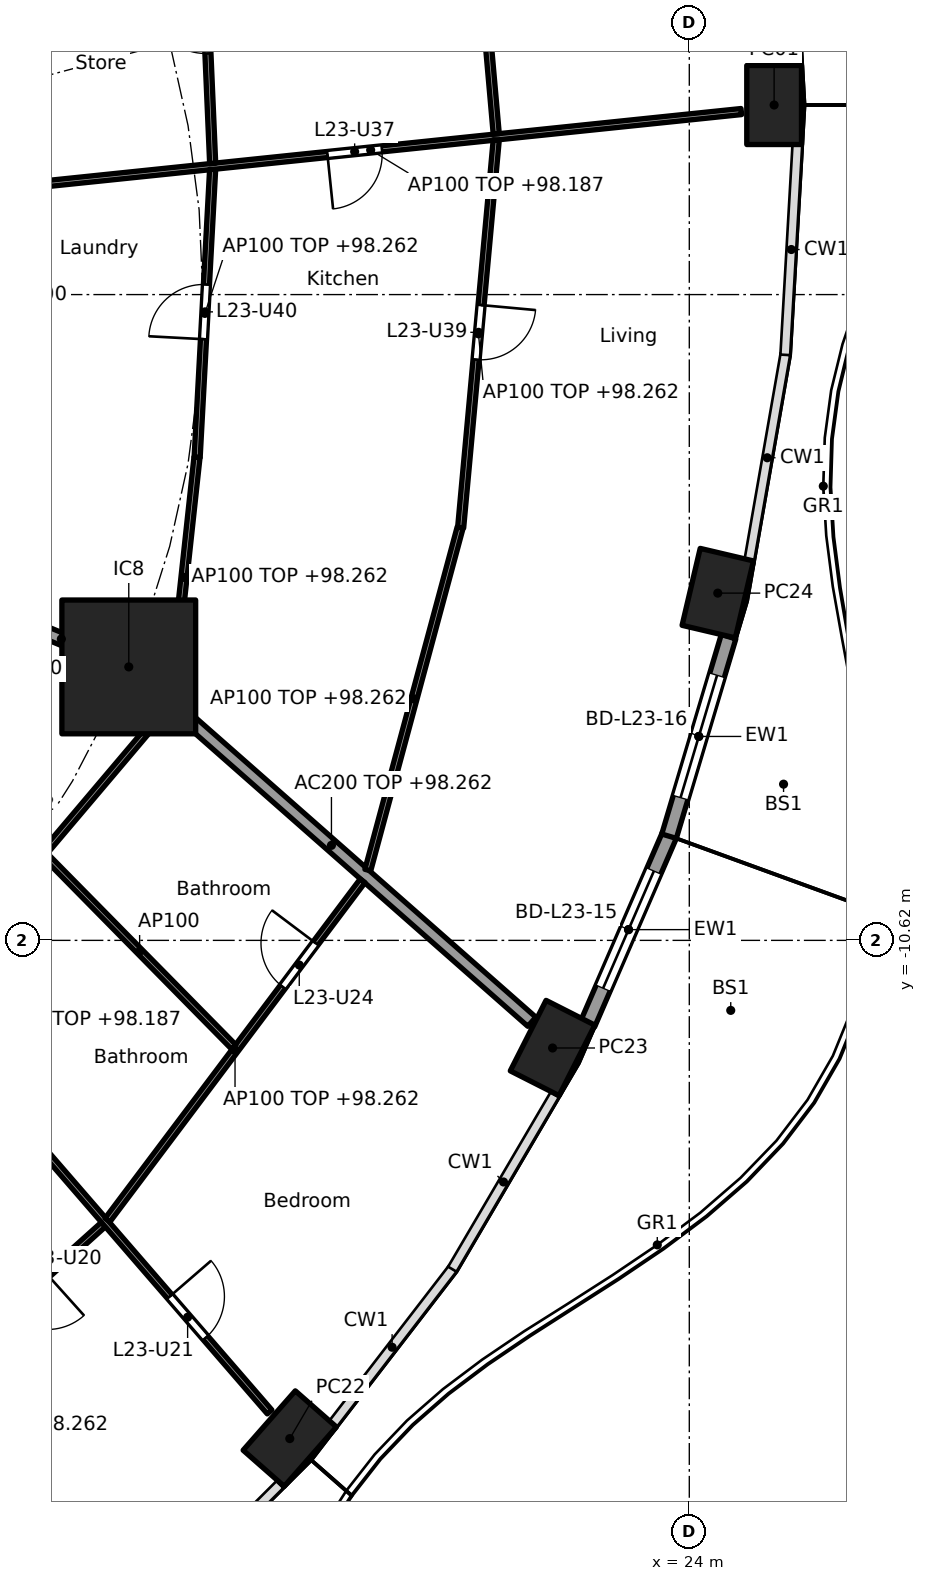
"""IFC4 building model, lengths in metres.
Left out: names, types, materials, properties, quantities, classifications, styles, units other than length and angle.
Written with IfcOpenShell. Run it as: python <this file> out.ifc"""

import sys

from ifc_helpers import new_model, si_unit, direction, frame, frame_2d, origin, origin_2d, place, context, subcontext, project, spatial, rectangle, hollow_rectangle, extrude, element, fill, save


model = new_model("IFC4")
c1 = context("Model", 3, precision=1e-05, world=origin(), true_north=direction((0.0, 1.0)))
c2 = subcontext(c1, "Body", "Model", "MODEL_VIEW")
j1 = project(units=[si_unit("LENGTHUNIT", "METRE"), si_unit("PLANEANGLEUNIT", "RADIAN")], contexts=[c1])
p1 = place(None, origin())
s1 = spatial("IfcSite", under=j1, at=p1, CompositionType="ELEMENT")
p2 = place(p1, origin())
s2 = spatial("IfcBuilding", under=s1, at=p2, CompositionType="ELEMENT")
p3 = place(p2, frame((0.0, 0.0, 95.5)))
s3 = spatial("IfcBuildingStorey", under=s2, at=p3, CompositionType="ELEMENT", Elevation=95.5)
for number, where, z_axis, x_axis in (
    (1, (25.395, 3.118, 0.0), (0.0, 0.0, 1.0), (0.0, 1.0, 0.0)),
    (2, (17.43, -18.813, 0.0), (0.0, 0.0, 1.0), (0.66, 0.751, 0.0)),
    (3, (21.751, -12.39, 0.0), (0.0, 0.0, 1.0), (0.452, 0.892, 0.0)),
    (4, (24.468, -4.91, 0.0), (0.0, 0.0, 1.0), (0.229, 0.973, 0.0)),
):
    element("IfcColumn", number, at=place(p3, frame(where, z_axis=z_axis, x_axis=x_axis)), inside=s3, PredefinedType="COLUMN", context=c2, shape_type="SweptSolid", body=[
        extrude(hollow_rectangle(XDim=1.3, YDim=0.9, WallThickness=0.045, at=origin_2d()), origin(), (0.0, 0.0, 1.0), 3.7),
    ])
p4 = place(p3, frame((14.782, -6.123, 0.0), z_axis=(0.0, 0.0, 1.0), x_axis=(1.0, 0.0, 0.0)))
e5 = element("IfcColumn", 5, at=p4, inside=s3, PredefinedType="COLUMN", context=c2, shape_type="SweptSolid", body=[
    extrude(rectangle(XDim=2.2, YDim=2.2, at=origin_2d()), origin(), (0.0, 0.0, 1.0), 3.7),
])
p5 = place(p3, frame((23.672, -8.893, 0.0), z_axis=(0.0, 0.0, 1.0), x_axis=(-0.397621629246, -0.917549475481, 0.0)))
e6 = element("IfcWall", 6, at=p5, inside=s3, PredefinedType="SOLIDWALL", context=c2, shape_type="SweptSolid", body=[
    extrude(rectangle(XDim=3.379, YDim=0.25, at=frame_2d((1.69, 0.0))), origin(), (0.0, 0.0, 1.0), 3.44),
])
p6 = place(p5, frame((0.64, 0.0, 0.0)))
e7 = element("IfcOpeningElement", 7, at=p6, cuts=e6, PredefinedType="OPENING", context=c2, shape_type="SweptSolid", body=[
    extrude(rectangle(XDim=2.1, YDim=2.4, at=frame_2d((1.05, 1.2))), frame((0.0, 0.135, 0.0), z_axis=(0.0, -1.0, 0.0), x_axis=(1.0, 0.0, 0.0)), (0.0, 0.0, 1.0), 0.27),
])
p7 = place(p3, frame((24.646, -5.626, 0.0), z_axis=(0.0, 0.0, 1.0), x_axis=(-0.285901631201, -0.958258971926, 0.0)))
e8 = element("IfcWall", 8, at=p7, inside=s3, PredefinedType="SOLIDWALL", context=c2, shape_type="SweptSolid", body=[
    extrude(rectangle(XDim=3.423, YDim=0.25, at=frame_2d((1.712, 0.0))), origin(), (0.0, 0.0, 1.0), 3.44),
])
p8 = place(p7, frame((0.662, 0.0, 0.0)))
e9 = element("IfcOpeningElement", 9, at=p8, cuts=e8, PredefinedType="OPENING", context=c2, shape_type="SweptSolid", body=[
    extrude(rectangle(XDim=2.1, YDim=2.4, at=frame_2d((1.05, 1.2))), frame((0.0, 0.135, 0.0), z_axis=(0.0, -1.0, 0.0), x_axis=(1.0, 0.0, 0.0)), (0.0, 0.0, 1.0), 0.27),
])
p9 = place(p3, frame((12.657, -5.243, 0.0), z_axis=(0.0, 0.0, 1.0), x_axis=(0.923876145736, -0.382691608661, 0.0)))
e10 = element("IfcWall", 10, at=p9, inside=s3, PredefinedType="PARTITIONING", context=c2, shape_type="SweptSolid", body=[
    extrude(rectangle(XDim=2.2, YDim=0.2, at=frame_2d((1.1, 0.0))), origin(), (0.0, 0.0, 1.0), 3.44),
])
p10 = place(p3, frame((14.82, -6.156, 0.0), z_axis=(0.0, 0.0, 1.0), x_axis=(0.750582231659, -0.660777052808, 0.0)))
e11 = element("IfcWall", 11, at=p10, inside=s3, PredefinedType="PARTITIONING", context=c2, shape_type="SweptSolid", body=[
    extrude(rectangle(XDim=8.781, YDim=0.2, at=frame_2d((4.391, 0.0))), origin(), (0.0, 0.0, 1.0), 2.762),
])
p11 = place(p3, frame((12.664, 1.745, 0.0), z_axis=(0.0, 0.0, 1.0), x_axis=(0.994662790212, 0.103179134358, 0.0)))
e12 = element("IfcWall", 12, at=p11, inside=s3, PredefinedType="PARTITIONING", context=c2, shape_type="SweptSolid", body=[
    extrude(rectangle(XDim=12.257, YDim=0.1, at=frame_2d((6.128, 0.0))), origin(), (0.0, 0.0, 1.0), 2.687),
])
p12 = place(p11, frame((5.414, 0.0, 0.0)))
e13 = element("IfcOpeningElement", 13, at=p12, cuts=e12, PredefinedType="OPENING", context=c2, shape_type="SweptSolid", body=[
    extrude(rectangle(XDim=0.9, YDim=2.1, at=frame_2d((0.45, 1.05))), frame((0.0, 0.06, 0.0), z_axis=(0.0, -1.0, 0.0), x_axis=(1.0, 0.0, 0.0)), (0.0, 0.0, 1.0), 0.12),
])
p13 = place(p3, frame((16.162, 2.158, 0.0), z_axis=(0.0, 0.0, 1.0), x_axis=(-0.043120653248, 0.999069872063, 0.0)))
e14 = element("IfcWall", 14, at=p13, inside=s3, PredefinedType="PARTITIONING", context=c2, shape_type="SweptSolid", body=[
    extrude(rectangle(XDim=4.518, YDim=0.1, at=frame_2d((2.259, 0.0))), origin(), (0.0, 0.0, 1.0), 3.44),
])
p14 = place(p13, frame((1.809, 0.0, 0.0)))
e15 = element("IfcOpeningElement", 15, at=p14, cuts=e14, PredefinedType="OPENING", context=c2, shape_type="SweptSolid", body=[
    extrude(rectangle(XDim=0.9, YDim=2.1, at=frame_2d((0.45, 1.05))), frame((0.0, 0.06, 0.0), z_axis=(0.0, -1.0, 0.0), x_axis=(1.0, 0.0, 0.0)), (0.0, 0.0, 1.0), 0.12),
])
p15 = place(p3, frame((16.161, 2.058, 0.0), z_axis=(0.0, 0.0, 1.0), x_axis=(-0.053696394729, -0.998557307916, 0.0)))
e16 = element("IfcWall", 16, at=p15, inside=s3, PredefinedType="PARTITIONING", context=c2, shape_type="SweptSolid", body=[
    extrude(rectangle(XDim=4.742, YDim=0.1, at=frame_2d((2.371, 0.0))), origin(), (0.0, 0.0, 1.0), 2.762),
])
p16 = place(p15, frame((1.896, 0.0, 0.0)))
e17 = element("IfcOpeningElement", 17, at=p16, cuts=e16, PredefinedType="OPENING", context=c2, shape_type="SweptSolid", body=[
    extrude(rectangle(XDim=0.9, YDim=2.1, at=frame_2d((0.45, 1.05))), frame((0.0, 0.06, 0.0), z_axis=(0.0, -1.0, 0.0), x_axis=(1.0, 0.0, 0.0)), (0.0, 0.0, 1.0), 0.12),
])
p17 = place(p3, frame((20.825, 2.642, 0.0), z_axis=(0.0, 0.0, 1.0), x_axis=(-0.08776338161, 0.996141349834, 0.0)))
e18 = element("IfcWall", 18, at=p17, inside=s3, PredefinedType="PARTITIONING", context=c2, shape_type="SweptSolid", body=[
    extrude(rectangle(XDim=6.337, YDim=0.1, at=frame_2d((3.168, 0.0))), origin(), (0.0, 0.0, 1.0), 2.762),
])
p18 = place(p17, frame((2.694, 0.0, 0.0)))
e19 = element("IfcOpeningElement", 19, at=p18, cuts=e18, PredefinedType="OPENING", context=c2, shape_type="SweptSolid", body=[
    extrude(rectangle(XDim=0.9, YDim=2.1, at=frame_2d((0.45, 1.05))), frame((0.0, 0.06, 0.0), z_axis=(0.0, -1.0, 0.0), x_axis=(1.0, 0.0, 0.0)), (0.0, 0.0, 1.0), 0.12),
])
p19 = place(p3, frame((20.825, 2.542, 0.0), z_axis=(0.0, 0.0, 1.0), x_axis=(-0.09140211812, -0.995814065377, 0.0)))
e20 = element("IfcWall", 20, at=p19, inside=s3, PredefinedType="PARTITIONING", context=c2, shape_type="SweptSolid", body=[
    extrude(rectangle(XDim=6.403, YDim=0.1, at=frame_2d((3.201, 0.0))), origin(), (0.0, 0.0, 1.0), 2.762),
])
p20 = place(p19, frame((2.726, 0.0, 0.0)))
e21 = element("IfcOpeningElement", 21, at=p20, cuts=e20, PredefinedType="OPENING", context=c2, shape_type="SweptSolid", body=[
    extrude(rectangle(XDim=0.9, YDim=2.1, at=frame_2d((0.45, 1.05))), frame((0.0, 0.06, 0.0), z_axis=(0.0, -1.0, 0.0), x_axis=(1.0, 0.0, 0.0)), (0.0, 0.0, 1.0), 0.12),
])
p21 = place(p3, frame((9.272, -19.868, 0.0), z_axis=(0.0, 0.0, 1.0), x_axis=(0.743884413566, 0.668308296562, 0.0)))
e22 = element("IfcWall", 22, at=p21, inside=s3, PredefinedType="PARTITIONING", context=c2, shape_type="SweptSolid", body=[
    extrude(rectangle(XDim=6.845, YDim=0.1, at=frame_2d((3.423, 0.0))), origin(), (0.0, 0.0, 1.0), 2.762),
])
p22 = place(p21, frame((4.709, 0.0, 0.0)))
e23 = element("IfcOpeningElement", 23, at=p22, cuts=e22, PredefinedType="OPENING", context=c2, shape_type="SweptSolid", body=[
    extrude(rectangle(XDim=0.9, YDim=2.1, at=frame_2d((0.45, 1.05))), frame((0.0, 0.06, 0.0), z_axis=(0.0, -1.0, 0.0), x_axis=(1.0, 0.0, 0.0)), (0.0, 0.0, 1.0), 0.12),
])
p23 = place(p3, frame((8.95, -8.96, 0.0), z_axis=(0.0, 0.0, 1.0), x_axis=(0.65441081073, -0.756139200676, 0.0)))
e24 = element("IfcWall", 24, at=p23, inside=s3, PredefinedType="PARTITIONING", context=c2, shape_type="SweptSolid", body=[
    extrude(rectangle(XDim=12.451, YDim=0.1, at=frame_2d((6.226, 0.0))), origin(), (0.0, 0.0, 1.0), 2.687),
])
p24 = place(p23, frame((1.336, 0.0, 0.0)))
e25 = element("IfcOpeningElement", 25, at=p24, cuts=e24, PredefinedType="OPENING", context=c2, shape_type="SweptSolid", body=[
    extrude(rectangle(XDim=0.9, YDim=2.1, at=frame_2d((0.45, 1.05))), frame((0.0, 0.06, 0.0), z_axis=(0.0, -1.0, 0.0), x_axis=(1.0, 0.0, 0.0)), (0.0, 0.0, 1.0), 0.12),
])
p25 = place(p23, frame((5.501, 0.0, 0.0)))
e26 = element("IfcOpeningElement", 26, at=p25, cuts=e24, PredefinedType="OPENING", context=c2, shape_type="SweptSolid", body=[
    extrude(rectangle(XDim=0.9, YDim=2.1, at=frame_2d((0.45, 1.05))), frame((0.0, 0.06, 0.0), z_axis=(0.0, -1.0, 0.0), x_axis=(1.0, 0.0, 0.0)), (0.0, 0.0, 1.0), 0.12),
])
p26 = place(p23, frame((9.941, 0.0, 0.0)))
e27 = element("IfcOpeningElement", 27, at=p26, cuts=e24, PredefinedType="OPENING", context=c2, shape_type="SweptSolid", body=[
    extrude(rectangle(XDim=0.9, YDim=2.1, at=frame_2d((0.45, 1.05))), frame((0.0, 0.06, 0.0), z_axis=(0.0, -1.0, 0.0), x_axis=(1.0, 0.0, 0.0)), (0.0, 0.0, 1.0), 0.12),
])
p27 = place(p3, frame((11.32, -11.623, 0.0), z_axis=(0.0, 0.0, 1.0), x_axis=(0.646106810963, 0.763247003811, 0.0)))
e28 = element("IfcWall", 28, at=p27, inside=s3, PredefinedType="PARTITIONING", context=c2, shape_type="SweptSolid", body=[
    extrude(rectangle(XDim=6.317, YDim=0.1, at=frame_2d((3.159, 0.0))), origin(), (0.0, 0.0, 1.0), 2.762),
])
p28 = place(p3, frame((14.432, -15.219, 0.0), z_axis=(0.0, 0.0, 1.0), x_axis=(0.601001256685, 0.799248077548, 0.0)))
e29 = element("IfcWall", 29, at=p28, inside=s3, PredefinedType="PARTITIONING", context=c2, shape_type="SweptSolid", body=[
    extrude(rectangle(XDim=6.98, YDim=0.1, at=frame_2d((3.49, 0.0))), origin(), (0.0, 0.0, 1.0), 2.762),
])
p29 = place(p28, frame((4.798, 0.0, 0.0)))
e30 = element("IfcOpeningElement", 30, at=p29, cuts=e29, PredefinedType="OPENING", context=c2, shape_type="SweptSolid", body=[
    extrude(rectangle(XDim=0.9, YDim=2.1, at=frame_2d((0.45, 1.05))), frame((0.0, 0.06, 0.0), z_axis=(0.0, -1.0, 0.0), x_axis=(1.0, 0.0, 0.0)), (0.0, 0.0, 1.0), 0.12),
])
p30 = place(p3, frame((13.412, -9.229, 0.0), z_axis=(0.0, 0.0, 1.0), x_axis=(0.701611164285, -0.712560014421, 0.0)))
e31 = element("IfcWall", 31, at=p30, inside=s3, PredefinedType="PARTITIONING", context=c2, shape_type="SweptSolid", body=[
    extrude(rectangle(XDim=4.415, YDim=0.1, at=frame_2d((2.208, 0.0))), origin(), (0.0, 0.0, 1.0), 3.44),
])
p31 = place(p3, frame((15.477, -6.625, 0.0), z_axis=(0.0, 0.0, 1.0), x_axis=(0.107570517496, 0.994197457131, 0.0)))
e32 = element("IfcWall", 32, at=p31, inside=s3, PredefinedType="PARTITIONING", context=c2, shape_type="SweptSolid", body=[
    extrude(rectangle(XDim=3.972, YDim=0.1, at=frame_2d((1.986, 0.0))), origin(), (0.0, 0.0, 1.0), 2.762),
])
p32 = place(p3, frame((18.713, -9.464, 0.0), z_axis=(0.0, 0.0, 1.0), x_axis=(0.260279646259, 0.965533275316, 0.0)))
e33 = element("IfcWall", 33, at=p32, inside=s3, PredefinedType="PARTITIONING", context=c2, shape_type="SweptSolid", body=[
    extrude(rectangle(XDim=5.833, YDim=0.1, at=frame_2d((2.917, 0.0))), origin(), (0.0, 0.0, 1.0), 2.762),
])
p33 = place(p6, origin())
e34 = element("IfcDoor", 34, at=p33, inside=s3, OperationType="SLIDING_TO_LEFT", PredefinedType="DOOR", context=c2, shape_type="SweptSolid", body=[
    extrude(rectangle(XDim=2.1, YDim=2.4, at=frame_2d((1.05, 1.2))), frame((0.0, 0.025, 0.0), z_axis=(0.0, -1.0, 0.0), x_axis=(1.0, 0.0, 0.0)), (0.0, 0.0, 1.0), 0.05),
])
fill(e7, e34)
p34 = place(p8, origin())
e35 = element("IfcDoor", 35, at=p34, inside=s3, OperationType="SLIDING_TO_LEFT", PredefinedType="DOOR", context=c2, shape_type="SweptSolid", body=[
    extrude(rectangle(XDim=2.1, YDim=2.4, at=frame_2d((1.05, 1.2))), frame((0.0, 0.025, 0.0), z_axis=(0.0, -1.0, 0.0), x_axis=(1.0, 0.0, 0.0)), (0.0, 0.0, 1.0), 0.05),
])
fill(e9, e35)
p35 = place(p26, origin())
e36 = element("IfcDoor", 36, at=p35, inside=s3, OperationType="SINGLE_SWING_LEFT", PredefinedType="DOOR", context=c2, shape_type="SweptSolid", body=[
    extrude(rectangle(XDim=0.9, YDim=2.1, at=frame_2d((0.45, 1.05))), frame((0.0, 0.025, 0.0), z_axis=(0.0, -1.0, 0.0), x_axis=(1.0, 0.0, 0.0)), (0.0, 0.0, 1.0), 0.05),
])
fill(e27, e36)
p36 = place(p29, origin())
e37 = element("IfcDoor", 37, at=p36, inside=s3, OperationType="SINGLE_SWING_RIGHT", PredefinedType="DOOR", context=c2, shape_type="SweptSolid", body=[
    extrude(rectangle(XDim=0.9, YDim=2.1, at=frame_2d((0.45, 1.05))), frame((0.0, 0.025, 0.0), z_axis=(0.0, -1.0, 0.0), x_axis=(1.0, 0.0, 0.0)), (0.0, 0.0, 1.0), 0.05),
])
fill(e30, e37)
p37 = place(p14, origin())
e38 = element("IfcDoor", 38, at=p37, inside=s3, OperationType="SINGLE_SWING_RIGHT", PredefinedType="DOOR", context=c2, shape_type="SweptSolid", body=[
    extrude(rectangle(XDim=0.9, YDim=2.1, at=frame_2d((0.45, 1.05))), frame((0.0, 0.025, 0.0), z_axis=(0.0, -1.0, 0.0), x_axis=(1.0, 0.0, 0.0)), (0.0, 0.0, 1.0), 0.05),
])
fill(e15, e38)
p38 = place(p12, frame((0.9, 0.0, 0.0), x_axis=(-1.0, 0.0, 0.0)))
e39 = element("IfcDoor", 39, at=p38, inside=s3, OperationType="SINGLE_SWING_RIGHT", PredefinedType="DOOR", context=c2, shape_type="SweptSolid", body=[
    extrude(rectangle(XDim=0.9, YDim=2.1, at=frame_2d((0.45, 1.05))), frame((0.0, 0.025, 0.0), z_axis=(0.0, -1.0, 0.0), x_axis=(1.0, 0.0, 0.0)), (0.0, 0.0, 1.0), 0.05),
])
fill(e13, e39)
p39 = place(p20, origin())
e40 = element("IfcDoor", 40, at=p39, inside=s3, OperationType="SINGLE_SWING_LEFT", PredefinedType="DOOR", context=c2, shape_type="SweptSolid", body=[
    extrude(rectangle(XDim=0.9, YDim=2.1, at=frame_2d((0.45, 1.05))), frame((0.0, 0.025, 0.0), z_axis=(0.0, -1.0, 0.0), x_axis=(1.0, 0.0, 0.0)), (0.0, 0.0, 1.0), 0.05),
])
fill(e21, e40)
p40 = place(p16, frame((0.9, 0.0, 0.0), x_axis=(-1.0, 0.0, 0.0)))
e41 = element("IfcDoor", 41, at=p40, inside=s3, OperationType="SINGLE_SWING_LEFT", PredefinedType="DOOR", context=c2, shape_type="SweptSolid", body=[
    extrude(rectangle(XDim=0.9, YDim=2.1, at=frame_2d((0.45, 1.05))), frame((0.0, 0.025, 0.0), z_axis=(0.0, -1.0, 0.0), x_axis=(1.0, 0.0, 0.0)), (0.0, 0.0, 1.0), 0.05),
])
fill(e17, e41)
save(model, sys.argv[1])
